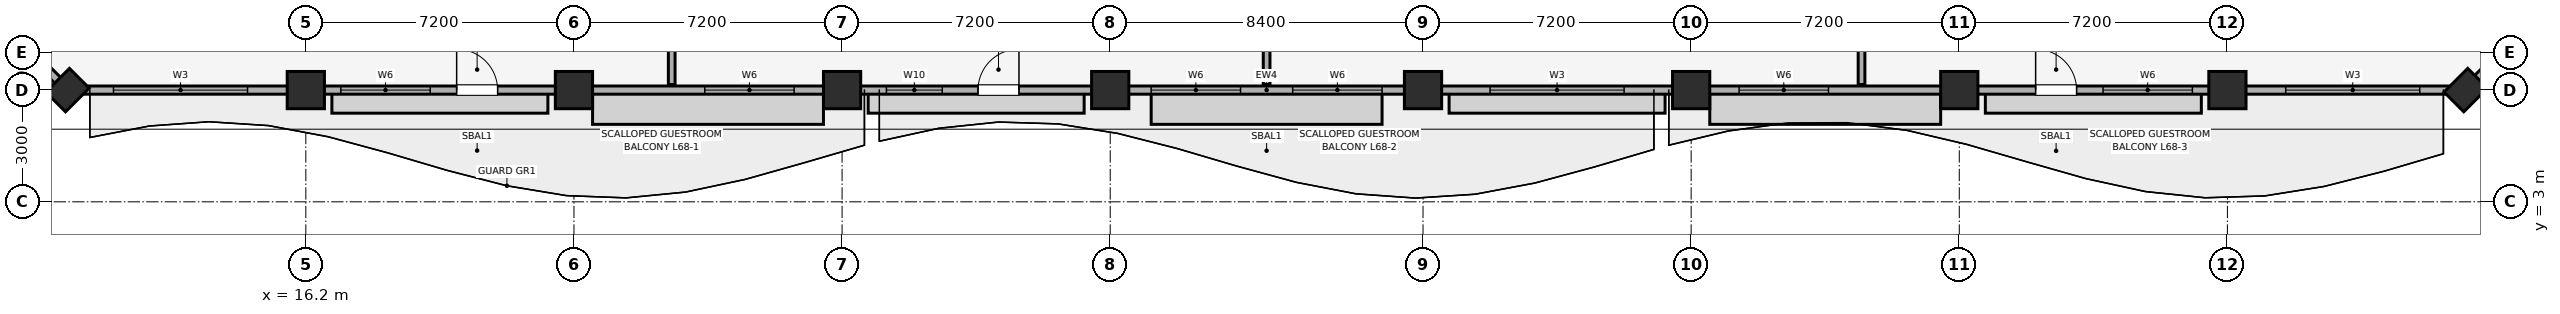
"""IFC4 building model, lengths in metres.
Left out: names, types, materials, properties, quantities, classifications, styles, units other than length and angle.
Written with IfcOpenShell. Run it as: python <this file> out.ifc"""

import sys

from ifc_helpers import new_model, si_unit, direction, frame, frame_2d, origin, origin_2d, place, context, subcontext, project, spatial, rectangle, extrude, element, fill, save


model = new_model("IFC4")
c1 = context("Model", 3, precision=1e-05, world=origin(), true_north=direction((0.0, 1.0)))
c2 = subcontext(c1, "Body", "Model", "MODEL_VIEW")
j1 = project(units=[si_unit("LENGTHUNIT", "METRE"), si_unit("PLANEANGLEUNIT", "RADIAN")], contexts=[c1])
p1 = place(None, origin())
s1 = spatial("IfcSite", under=j1, at=p1, CompositionType="ELEMENT")
p2 = place(p1, origin())
s2 = spatial("IfcBuilding", under=s1, at=p2, CompositionType="ELEMENT")
p3 = place(p2, frame((0.0, 0.0, 276.55)))
s3 = spatial("IfcBuildingStorey", under=s2, at=p3, CompositionType="ELEMENT", Elevation=276.55)
for number, where, z_axis, x_axis in (
    (1, (16.2, 6.0, 0.0), (0.0, 0.0, 1.0), (1.0, 0.0, 0.0)),
    (2, (23.4, 6.0, 0.0), (0.0, 0.0, 1.0), (1.0, 0.0, 0.0)),
    (3, (30.6, 6.0, 0.0), (0.0, 0.0, 1.0), (1.0, 0.0, 0.0)),
    (4, (37.8, 6.0, 0.0), (0.0, 0.0, 1.0), (1.0, 0.0, 0.0)),
    (5, (46.2, 6.0, 0.0), (0.0, 0.0, 1.0), (1.0, 0.0, 0.0)),
    (6, (53.4, 6.0, 0.0), (0.0, 0.0, 1.0), (1.0, 0.0, 0.0)),
    (7, (60.6, 6.0, 0.0), (0.0, 0.0, 1.0), (1.0, 0.0, 0.0)),
    (8, (67.8, 6.0, 0.0), (0.0, 0.0, 1.0), (1.0, 0.0, 0.0)),
):
    element("IfcColumn", number, at=place(p3, frame(where, z_axis=z_axis, x_axis=x_axis)), inside=s3, PredefinedType="COLUMN", context=c2, shape_type="SweptSolid", body=[
        extrude(rectangle(XDim=1.0, YDim=1.0, at=origin_2d()), origin(), (0.0, 0.0, 1.0), 3.6),
    ])
for number, where, z_axis, x_axis in (
    (9, (9.8, 6.0, 0.0), (0.0, 0.0, 1.0), (0.707, 0.707, 0.0)),
    (10, (74.2, 6.0, 0.0), (0.0, 0.0, 1.0), (0.707, 0.707, 0.0)),
):
    element("IfcColumn", number, at=place(p3, frame(where, z_axis=z_axis, x_axis=x_axis)), inside=s3, PredefinedType="PILASTER", context=c2, shape_type="SweptSolid", body=[
        extrude(rectangle(XDim=0.9, YDim=0.75, at=origin_2d()), origin(), (0.0, 0.0, 1.0), 3.6),
    ])
p4 = place(p3, frame((9.8, 6.0, 0.0), z_axis=(0.0, 0.0, 1.0), x_axis=(1.0, 0.0, 0.0)))
e11 = element("IfcWall", 11, at=p4, inside=s3, PredefinedType="SOLIDWALL", context=c2, shape_type="SweptSolid", body=[
    extrude(rectangle(XDim=64.4, YDim=0.22, at=frame_2d((32.2, 0.0))), origin(), (0.0, 0.0, 1.0), 2.8),
])
p5 = place(p4, frame((10.45, 0.0, 0.0)))
e12 = element("IfcOpeningElement", 12, at=p5, cuts=e11, PredefinedType="OPENING", context=c2, shape_type="SweptSolid", body=[
    extrude(rectangle(XDim=1.1, YDim=2.15, at=frame_2d((0.55, 1.075))), frame((0.0, 0.12, 0.0), z_axis=(0.0, -1.0, 0.0), x_axis=(1.0, 0.0, 0.0)), (0.0, 0.0, 1.0), 0.24),
])
p6 = place(p4, frame((24.45, 0.0, 0.0)))
e13 = element("IfcOpeningElement", 13, at=p6, cuts=e11, PredefinedType="OPENING", context=c2, shape_type="SweptSolid", body=[
    extrude(rectangle(XDim=1.1, YDim=2.15, at=frame_2d((0.55, 1.075))), frame((0.0, 0.12, 0.0), z_axis=(0.0, -1.0, 0.0), x_axis=(1.0, 0.0, 0.0)), (0.0, 0.0, 1.0), 0.24),
])
p7 = place(p4, frame((52.85, 0.0, 0.0)))
e14 = element("IfcOpeningElement", 14, at=p7, cuts=e11, PredefinedType="OPENING", context=c2, shape_type="SweptSolid", body=[
    extrude(rectangle(XDim=1.1, YDim=2.15, at=frame_2d((0.55, 1.075))), frame((0.0, 0.12, 0.0), z_axis=(0.0, -1.0, 0.0), x_axis=(1.0, 0.0, 0.0)), (0.0, 0.0, 1.0), 0.24),
])
p8 = place(p4, frame((1.235, 0.0, 0.85)))
e15 = element("IfcOpeningElement", 15, at=p8, cuts=e11, PredefinedType="OPENING", context=c2, shape_type="SweptSolid", body=[
    extrude(rectangle(XDim=3.6, YDim=1.75, at=frame_2d((1.8, 0.875))), frame((0.0, 0.12, 0.0), z_axis=(0.0, -1.0, 0.0), x_axis=(1.0, 0.0, 0.0)), (0.0, 0.0, 1.0), 0.24),
])
p9 = place(p4, frame((7.34, 0.0, 0.85)))
e16 = element("IfcOpeningElement", 16, at=p9, cuts=e11, PredefinedType="OPENING", context=c2, shape_type="SweptSolid", body=[
    extrude(rectangle(XDim=2.4, YDim=1.5, at=frame_2d((1.2, 0.75))), frame((0.0, 0.12, 0.0), z_axis=(0.0, -1.0, 0.0), x_axis=(1.0, 0.0, 0.0)), (0.0, 0.0, 1.0), 0.24),
])
p10 = place(p4, frame((17.113, 0.0, 0.85)))
e17 = element("IfcOpeningElement", 17, at=p10, cuts=e11, PredefinedType="OPENING", context=c2, shape_type="SweptSolid", body=[
    extrude(rectangle(XDim=2.4, YDim=1.5, at=frame_2d((1.2, 0.75))), frame((0.0, 0.12, 0.0), z_axis=(0.0, -1.0, 0.0), x_axis=(1.0, 0.0, 0.0)), (0.0, 0.0, 1.0), 0.24),
])
p11 = place(p4, frame((21.99, 0.0, 0.85)))
e18 = element("IfcOpeningElement", 18, at=p11, cuts=e11, PredefinedType="OPENING", context=c2, shape_type="SweptSolid", body=[
    extrude(rectangle(XDim=1.5, YDim=1.4, at=frame_2d((0.75, 0.7))), frame((0.0, 0.12, 0.0), z_axis=(0.0, -1.0, 0.0), x_axis=(1.0, 0.0, 0.0)), (0.0, 0.0, 1.0), 0.24),
])
p12 = place(p4, frame((29.1, 0.0, 0.85)))
e19 = element("IfcOpeningElement", 19, at=p12, cuts=e11, PredefinedType="OPENING", context=c2, shape_type="SweptSolid", body=[
    extrude(rectangle(XDim=2.4, YDim=1.5, at=frame_2d((1.2, 0.75))), frame((0.0, 0.12, 0.0), z_axis=(0.0, -1.0, 0.0), x_axis=(1.0, 0.0, 0.0)), (0.0, 0.0, 1.0), 0.24),
])
p13 = place(p4, frame((32.9, 0.0, 0.85)))
e20 = element("IfcOpeningElement", 20, at=p13, cuts=e11, PredefinedType="OPENING", context=c2, shape_type="SweptSolid", body=[
    extrude(rectangle(XDim=2.4, YDim=1.5, at=frame_2d((1.2, 0.75))), frame((0.0, 0.12, 0.0), z_axis=(0.0, -1.0, 0.0), x_axis=(1.0, 0.0, 0.0)), (0.0, 0.0, 1.0), 0.24),
])
p14 = place(p4, frame((38.2, 0.0, 0.85)))
e21 = element("IfcOpeningElement", 21, at=p14, cuts=e11, PredefinedType="OPENING", context=c2, shape_type="SweptSolid", body=[
    extrude(rectangle(XDim=3.6, YDim=1.75, at=frame_2d((1.8, 0.875))), frame((0.0, 0.12, 0.0), z_axis=(0.0, -1.0, 0.0), x_axis=(1.0, 0.0, 0.0)), (0.0, 0.0, 1.0), 0.24),
])
p15 = place(p4, frame((44.887, 0.0, 0.85)))
e22 = element("IfcOpeningElement", 22, at=p15, cuts=e11, PredefinedType="OPENING", context=c2, shape_type="SweptSolid", body=[
    extrude(rectangle(XDim=2.4, YDim=1.5, at=frame_2d((1.2, 0.75))), frame((0.0, 0.12, 0.0), z_axis=(0.0, -1.0, 0.0), x_axis=(1.0, 0.0, 0.0)), (0.0, 0.0, 1.0), 0.24),
])
p16 = place(p4, frame((54.66, 0.0, 0.85)))
e23 = element("IfcOpeningElement", 23, at=p16, cuts=e11, PredefinedType="OPENING", context=c2, shape_type="SweptSolid", body=[
    extrude(rectangle(XDim=2.4, YDim=1.5, at=frame_2d((1.2, 0.75))), frame((0.0, 0.12, 0.0), z_axis=(0.0, -1.0, 0.0), x_axis=(1.0, 0.0, 0.0)), (0.0, 0.0, 1.0), 0.24),
])
p17 = place(p4, frame((59.565, 0.0, 0.85)))
e24 = element("IfcOpeningElement", 24, at=p17, cuts=e11, PredefinedType="OPENING", context=c2, shape_type="SweptSolid", body=[
    extrude(rectangle(XDim=3.6, YDim=1.75, at=frame_2d((1.8, 0.875))), frame((0.0, 0.12, 0.0), z_axis=(0.0, -1.0, 0.0), x_axis=(1.0, 0.0, 0.0)), (0.0, 0.0, 1.0), 0.24),
])
p18 = place(p3, frame((74.2, 6.0, 0.0), z_axis=(0.0, 0.0, 1.0), x_axis=(0.707106781187, 0.707106781187, 0.0)))
e25 = element("IfcWall", 25, at=p18, inside=s3, PredefinedType="SOLIDWALL", context=c2, shape_type="SweptSolid", body=[
    extrude(rectangle(XDim=5.374, YDim=0.22, at=frame_2d((2.687, 0.0))), origin(), (0.0, 0.0, 1.0), 2.8),
])
p19 = place(p18, frame((1.637, 0.0, 0.85)))
e26 = element("IfcOpeningElement", 26, at=p19, cuts=e25, PredefinedType="OPENING", context=c2, shape_type="SweptSolid", body=[
    extrude(rectangle(XDim=2.1, YDim=1.6, at=frame_2d((1.05, 0.8))), frame((0.0, 0.12, 0.0), z_axis=(0.0, -1.0, 0.0), x_axis=(1.0, 0.0, 0.0)), (0.0, 0.0, 1.0), 0.24),
])
p20 = place(p3, frame((6.0, 9.8, 0.0), z_axis=(0.0, 0.0, 1.0), x_axis=(0.707106781187, -0.707106781187, 0.0)))
e27 = element("IfcWall", 27, at=p20, inside=s3, PredefinedType="SOLIDWALL", context=c2, shape_type="SweptSolid", body=[
    extrude(rectangle(XDim=5.374, YDim=0.22, at=frame_2d((2.687, 0.0))), origin(), (0.0, 0.0, 1.0), 2.8),
])
p21 = place(p20, frame((1.637, 0.0, 0.85)))
e28 = element("IfcOpeningElement", 28, at=p21, cuts=e27, PredefinedType="OPENING", context=c2, shape_type="SweptSolid", body=[
    extrude(rectangle(XDim=2.1, YDim=1.6, at=frame_2d((1.05, 0.8))), frame((0.0, 0.12, 0.0), z_axis=(0.0, -1.0, 0.0), x_axis=(1.0, 0.0, 0.0)), (0.0, 0.0, 1.0), 0.24),
])
p22 = place(p3, frame((26.025, 6.15, 0.0), z_axis=(0.0, 0.0, 1.0), x_axis=(0.0, 1.0, 0.0)))
e29 = element("IfcWall", 29, at=p22, inside=s3, PredefinedType="PARTITIONING", context=c2, shape_type="SweptSolid", body=[
    extrude(rectangle(XDim=16.755, YDim=0.18, at=frame_2d((8.377, 0.0))), origin(), (0.0, 0.0, 1.0), 3.6),
])
p23 = place(p3, frame((42.0, 6.15, 0.0), z_axis=(0.0, 0.0, 1.0), x_axis=(0.0, 1.0, 0.0)))
e30 = element("IfcWall", 30, at=p23, inside=s3, PredefinedType="PARTITIONING", context=c2, shape_type="SweptSolid", body=[
    extrude(rectangle(XDim=16.755, YDim=0.18, at=frame_2d((8.377, 0.0))), origin(), (0.0, 0.0, 1.0), 3.0),
])
p24 = place(p3, frame((57.975, 6.15, 0.0), z_axis=(0.0, 0.0, 1.0), x_axis=(0.0, 1.0, 0.0)))
e31 = element("IfcWall", 31, at=p24, inside=s3, PredefinedType="PARTITIONING", context=c2, shape_type="SweptSolid", body=[
    extrude(rectangle(XDim=16.755, YDim=0.18, at=frame_2d((8.377, 0.0))), origin(), (0.0, 0.0, 1.0), 3.6),
])
p25 = place(p5, origin())
e32 = element("IfcDoor", 32, at=p25, inside=s3, OperationType="SINGLE_SWING_LEFT", PredefinedType="DOOR", context=c2, shape_type="SweptSolid", body=[
    extrude(rectangle(XDim=1.1, YDim=2.15, at=frame_2d((0.55, 1.075))), frame((0.0, 0.025, 0.0), z_axis=(0.0, -1.0, 0.0), x_axis=(1.0, 0.0, 0.0)), (0.0, 0.0, 1.0), 0.05),
])
fill(e12, e32)
p26 = place(p6, origin())
e33 = element("IfcDoor", 33, at=p26, inside=s3, OperationType="SINGLE_SWING_RIGHT", PredefinedType="DOOR", context=c2, shape_type="SweptSolid", body=[
    extrude(rectangle(XDim=1.1, YDim=2.15, at=frame_2d((0.55, 1.075))), frame((0.0, 0.025, 0.0), z_axis=(0.0, -1.0, 0.0), x_axis=(1.0, 0.0, 0.0)), (0.0, 0.0, 1.0), 0.05),
])
fill(e13, e33)
p27 = place(p7, origin())
e34 = element("IfcDoor", 34, at=p27, inside=s3, OperationType="SINGLE_SWING_LEFT", PredefinedType="DOOR", context=c2, shape_type="SweptSolid", body=[
    extrude(rectangle(XDim=1.1, YDim=2.15, at=frame_2d((0.55, 1.075))), frame((0.0, 0.025, 0.0), z_axis=(0.0, -1.0, 0.0), x_axis=(1.0, 0.0, 0.0)), (0.0, 0.0, 1.0), 0.05),
])
fill(e14, e34)
p28 = place(p8, origin())
e35 = element("IfcWindow", 35, at=p28, inside=s3, PartitioningType="SINGLE_PANEL", PredefinedType="WINDOW", context=c2, shape_type="SweptSolid", body=[
    extrude(rectangle(XDim=3.6, YDim=1.75, at=frame_2d((1.8, 0.875))), frame((0.0, 0.03, 0.0), z_axis=(0.0, -1.0, 0.0), x_axis=(1.0, 0.0, 0.0)), (0.0, 0.0, 1.0), 0.06),
])
fill(e15, e35)
p29 = place(p9, origin())
e36 = element("IfcWindow", 36, at=p29, inside=s3, PartitioningType="SINGLE_PANEL", PredefinedType="WINDOW", context=c2, shape_type="SweptSolid", body=[
    extrude(rectangle(XDim=2.4, YDim=1.5, at=frame_2d((1.2, 0.75))), frame((0.0, 0.03, 0.0), z_axis=(0.0, -1.0, 0.0), x_axis=(1.0, 0.0, 0.0)), (0.0, 0.0, 1.0), 0.06),
])
fill(e16, e36)
p30 = place(p10, origin())
e37 = element("IfcWindow", 37, at=p30, inside=s3, PartitioningType="SINGLE_PANEL", PredefinedType="WINDOW", context=c2, shape_type="SweptSolid", body=[
    extrude(rectangle(XDim=2.4, YDim=1.5, at=frame_2d((1.2, 0.75))), frame((0.0, 0.03, 0.0), z_axis=(0.0, -1.0, 0.0), x_axis=(1.0, 0.0, 0.0)), (0.0, 0.0, 1.0), 0.06),
])
fill(e17, e37)
p31 = place(p11, origin())
e38 = element("IfcWindow", 38, at=p31, inside=s3, PartitioningType="SINGLE_PANEL", PredefinedType="WINDOW", context=c2, shape_type="SweptSolid", body=[
    extrude(rectangle(XDim=1.5, YDim=1.4, at=frame_2d((0.75, 0.7))), frame((0.0, 0.03, 0.0), z_axis=(0.0, -1.0, 0.0), x_axis=(1.0, 0.0, 0.0)), (0.0, 0.0, 1.0), 0.06),
])
fill(e18, e38)
p32 = place(p12, origin())
e39 = element("IfcWindow", 39, at=p32, inside=s3, PartitioningType="SINGLE_PANEL", PredefinedType="WINDOW", context=c2, shape_type="SweptSolid", body=[
    extrude(rectangle(XDim=2.4, YDim=1.5, at=frame_2d((1.2, 0.75))), frame((0.0, 0.03, 0.0), z_axis=(0.0, -1.0, 0.0), x_axis=(1.0, 0.0, 0.0)), (0.0, 0.0, 1.0), 0.06),
])
fill(e19, e39)
p33 = place(p13, origin())
e40 = element("IfcWindow", 40, at=p33, inside=s3, PartitioningType="SINGLE_PANEL", PredefinedType="WINDOW", context=c2, shape_type="SweptSolid", body=[
    extrude(rectangle(XDim=2.4, YDim=1.5, at=frame_2d((1.2, 0.75))), frame((0.0, 0.03, 0.0), z_axis=(0.0, -1.0, 0.0), x_axis=(1.0, 0.0, 0.0)), (0.0, 0.0, 1.0), 0.06),
])
fill(e20, e40)
p34 = place(p14, origin())
e41 = element("IfcWindow", 41, at=p34, inside=s3, PartitioningType="SINGLE_PANEL", PredefinedType="WINDOW", context=c2, shape_type="SweptSolid", body=[
    extrude(rectangle(XDim=3.6, YDim=1.75, at=frame_2d((1.8, 0.875))), frame((0.0, 0.03, 0.0), z_axis=(0.0, -1.0, 0.0), x_axis=(1.0, 0.0, 0.0)), (0.0, 0.0, 1.0), 0.06),
])
fill(e21, e41)
p35 = place(p15, origin())
e42 = element("IfcWindow", 42, at=p35, inside=s3, PartitioningType="SINGLE_PANEL", PredefinedType="WINDOW", context=c2, shape_type="SweptSolid", body=[
    extrude(rectangle(XDim=2.4, YDim=1.5, at=frame_2d((1.2, 0.75))), frame((0.0, 0.03, 0.0), z_axis=(0.0, -1.0, 0.0), x_axis=(1.0, 0.0, 0.0)), (0.0, 0.0, 1.0), 0.06),
])
fill(e22, e42)
p36 = place(p16, origin())
e43 = element("IfcWindow", 43, at=p36, inside=s3, PartitioningType="SINGLE_PANEL", PredefinedType="WINDOW", context=c2, shape_type="SweptSolid", body=[
    extrude(rectangle(XDim=2.4, YDim=1.5, at=frame_2d((1.2, 0.75))), frame((0.0, 0.03, 0.0), z_axis=(0.0, -1.0, 0.0), x_axis=(1.0, 0.0, 0.0)), (0.0, 0.0, 1.0), 0.06),
])
fill(e23, e43)
p37 = place(p17, origin())
e44 = element("IfcWindow", 44, at=p37, inside=s3, PartitioningType="SINGLE_PANEL", PredefinedType="WINDOW", context=c2, shape_type="SweptSolid", body=[
    extrude(rectangle(XDim=3.6, YDim=1.75, at=frame_2d((1.8, 0.875))), frame((0.0, 0.03, 0.0), z_axis=(0.0, -1.0, 0.0), x_axis=(1.0, 0.0, 0.0)), (0.0, 0.0, 1.0), 0.06),
])
fill(e24, e44)
save(model, sys.argv[1])
